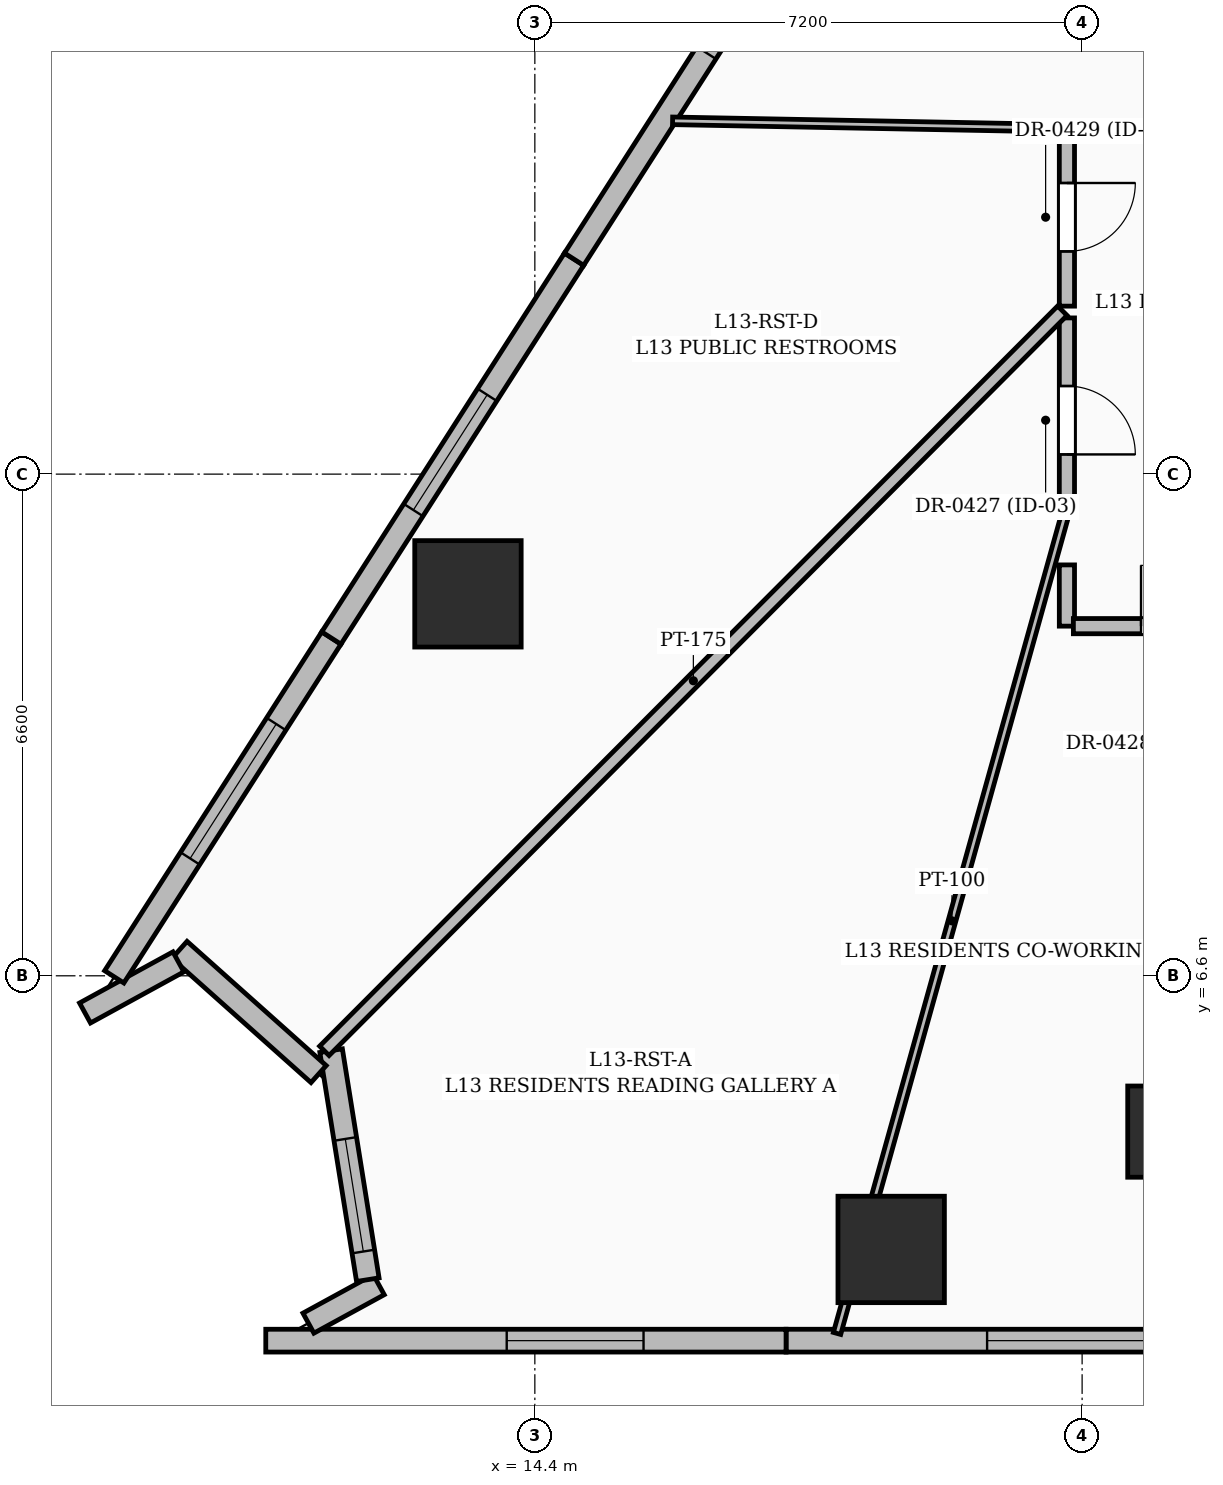
"""IFC4 building model, lengths in metres.
Left out: names, types, materials, properties, quantities, classifications, styles, units other than length and angle.
Written with IfcOpenShell. Run it as: python <this file> out.ifc"""

import sys

from ifc_helpers import new_model, si_unit, direction, frame, frame_2d, origin, origin_2d, place, context, subcontext, project, spatial, rectangle, extrude, element, fill, save


model = new_model("IFC4")
c1 = context("Model", 3, precision=1e-05, world=origin(), true_north=direction((0.0, 1.0)))
c2 = subcontext(c1, "Body", "Model", "MODEL_VIEW")
j1 = project(units=[si_unit("LENGTHUNIT", "METRE"), si_unit("PLANEANGLEUNIT", "RADIAN")], contexts=[c1])
p1 = place(None, origin())
s1 = spatial("IfcSite", under=j1, at=p1, CompositionType="ELEMENT")
p2 = place(p1, origin())
s2 = spatial("IfcBuilding", under=s1, at=p2, CompositionType="ELEMENT")
p3 = place(p2, frame((0.0, 0.0, 57.0)))
s3 = spatial("IfcBuildingStorey", under=s2, at=p3, CompositionType="ELEMENT", Elevation=57.0)
p4 = place(p3, frame((22.8, 4.55, 0.0), z_axis=(0.0, 0.0, 1.0), x_axis=(1.0, 0.0, 0.0)))
e1 = element("IfcColumn", 1, at=p4, inside=s3, PredefinedType="COLUMN", context=c2, shape_type="SweptSolid", body=[
    extrude(rectangle(XDim=1.2, YDim=1.2, at=origin_2d()), origin(), (0.0, 0.0, 1.0), 3.6),
])
for number, where, z_axis, x_axis in (
    (2, (19.088, 3.0, 0.0), (0.0, 0.0, 1.0), (1.0, 0.0, 0.0)),
    (3, (13.52, 11.625, 0.0), (0.0, 0.0, 1.0), (1.0, 0.0, 0.0)),
):
    element("IfcColumn", number, at=place(p3, frame(where, z_axis=z_axis, x_axis=x_axis)), inside=s3, PredefinedType="COLUMN", context=c2, shape_type="SweptSolid", body=[
        extrude(rectangle(XDim=1.4, YDim=1.4, at=origin_2d()), origin(), (0.0, 0.0, 1.0), 3.6),
    ])
p5 = place(p3, frame((24.55, 1.8, 0.0), z_axis=(0.0, 0.0, 1.0), x_axis=(-1.0, 0.0, 0.0)))
e4 = element("IfcWall", 4, at=p5, inside=s3, PredefinedType="SOLIDWALL", context=c2, shape_type="SweptSolid", body=[
    extrude(rectangle(XDim=6.845, YDim=0.3, at=frame_2d((3.422, 0.0))), origin(), (0.0, 0.0, 1.0), 3.35),
])
p6 = place(p5, frame((2.1, 0.0, 0.55)))
e5 = element("IfcOpeningElement", 5, at=p6, cuts=e4, PredefinedType="OPENING", context=c2, shape_type="SweptSolid", body=[
    extrude(rectangle(XDim=2.1, YDim=2.4, at=frame_2d((1.05, 1.2))), frame((0.0, 0.16, 0.0), z_axis=(0.0, -1.0, 0.0), x_axis=(1.0, 0.0, 0.0)), (0.0, 0.0, 1.0), 0.32),
])
p7 = place(p3, frame((17.705, 1.8, 0.0), z_axis=(0.0, 0.0, 1.0), x_axis=(-1.0, 0.0, 0.0)))
e6 = element("IfcWall", 6, at=p7, inside=s3, PredefinedType="SOLIDWALL", context=c2, shape_type="SweptSolid", body=[
    extrude(rectangle(XDim=6.845, YDim=0.3, at=frame_2d((3.422, 0.0))), origin(), (0.0, 0.0, 1.0), 3.35),
])
p8 = place(p7, frame((1.875, 0.0, 0.6)))
e7 = element("IfcOpeningElement", 7, at=p8, cuts=e6, PredefinedType="OPENING", context=c2, shape_type="SweptSolid", body=[
    extrude(rectangle(XDim=1.8, YDim=2.1, at=frame_2d((0.9, 1.05))), frame((0.0, 0.16, 0.0), z_axis=(0.0, -1.0, 0.0), x_axis=(1.0, 0.0, 0.0)), (0.0, 0.0, 1.0), 0.32),
])
p9 = place(p3, frame((11.421, 2.03, 0.0), z_axis=(0.0, 0.0, 1.0), x_axis=(0.877488347229, 0.479597957124, 0.0)))
e8 = element("IfcWall", 8, at=p9, inside=s3, PredefinedType="SOLIDWALL", context=c2, shape_type="SweptSolid", body=[
    extrude(rectangle(XDim=1.055, YDim=0.3, at=frame_2d((0.527, 0.0))), origin(), (0.0, 0.0, 1.0), 3.35),
])
p10 = place(p3, frame((12.203, 2.602, 0.0), z_axis=(0.0, 0.0, 1.0), x_axis=(-0.158180850876, 0.987410157136, 0.0)))
e9 = element("IfcWall", 9, at=p10, inside=s3, PredefinedType="SOLIDWALL", context=c2, shape_type="SweptSolid", body=[
    extrude(rectangle(XDim=3.051, YDim=0.3, at=frame_2d((1.526, 0.0))), origin(), (0.0, 0.0, 1.0), 3.35),
])
p11 = place(p10, frame((0.375, 0.0, 0.6)))
e10 = element("IfcOpeningElement", 10, at=p11, cuts=e9, PredefinedType="OPENING", context=c2, shape_type="SweptSolid", body=[
    extrude(rectangle(XDim=1.5, YDim=2.1, at=frame_2d((0.75, 1.05))), frame((0.0, 0.16, 0.0), z_axis=(0.0, -1.0, 0.0), x_axis=(1.0, 0.0, 0.0)), (0.0, 0.0, 1.0), 0.32),
])
p12 = place(p3, frame((11.555, 5.307, 0.0), z_axis=(0.0, 0.0, 1.0), x_axis=(-0.746018862661, 0.665924812989, 0.0)))
e11 = element("IfcWall", 11, at=p12, inside=s3, PredefinedType="SOLIDWALL", context=c2, shape_type="SweptSolid", body=[
    extrude(rectangle(XDim=2.454, YDim=0.3, at=frame_2d((1.227, 0.0))), origin(), (0.0, 0.0, 1.0), 3.35),
])
p13 = place(p3, frame((9.711, 6.783, 0.0), z_axis=(0.0, 0.0, 1.0), x_axis=(-0.877215145436, -0.480097478245, 0.0)))
e12 = element("IfcWall", 12, at=p13, inside=s3, PredefinedType="SOLIDWALL", context=c2, shape_type="SweptSolid", body=[
    extrude(rectangle(XDim=1.4, YDim=0.3, at=frame_2d((0.7, 0.0))), origin(), (0.0, 0.0, 1.0), 3.35),
])
p14 = place(p3, frame((8.867, 6.586, 0.0), z_axis=(0.0, 0.0, 1.0), x_axis=(0.539507708659, 0.841980660287, 0.0)))
e13 = element("IfcWall", 13, at=p14, inside=s3, PredefinedType="SOLIDWALL", context=c2, shape_type="SweptSolid", body=[
    extrude(rectangle(XDim=5.294, YDim=0.3, at=frame_2d((2.647, 0.0))), origin(), (0.0, 0.0, 1.0), 3.35),
])
p15 = place(p14, frame((1.85, 0.0, 0.55)))
e14 = element("IfcOpeningElement", 14, at=p15, cuts=e13, PredefinedType="OPENING", context=c2, shape_type="SweptSolid", body=[
    extrude(rectangle(XDim=2.1, YDim=2.4, at=frame_2d((1.05, 1.2))), frame((0.0, 0.16, 0.0), z_axis=(0.0, -1.0, 0.0), x_axis=(1.0, 0.0, 0.0)), (0.0, 0.0, 1.0), 0.32),
])
p16 = place(p3, frame((11.723, 11.044, 0.0), z_axis=(0.0, 0.0, 1.0), x_axis=(0.539512438074, 0.841977629847, 0.0)))
e15 = element("IfcWall", 15, at=p16, inside=s3, PredefinedType="SOLIDWALL", context=c2, shape_type="SweptSolid", body=[
    extrude(rectangle(XDim=5.919, YDim=0.3, at=frame_2d((2.959, 0.0))), origin(), (0.0, 0.0, 1.0), 3.35),
])
p17 = place(p16, frame((2.0, 0.0, 0.6)))
e16 = element("IfcOpeningElement", 16, at=p17, cuts=e15, PredefinedType="OPENING", context=c2, shape_type="SweptSolid", body=[
    extrude(rectangle(XDim=1.8, YDim=2.1, at=frame_2d((0.9, 1.05))), frame((0.0, 0.16, 0.0), z_axis=(0.0, -1.0, 0.0), x_axis=(1.0, 0.0, 0.0)), (0.0, 0.0, 1.0), 0.32),
])
p18 = place(p3, frame((14.916, 16.027, 0.0), z_axis=(0.0, 0.0, 1.0), x_axis=(0.53951188624, 0.841977983445, 0.0)))
e17 = element("IfcWall", 17, at=p18, inside=s3, PredefinedType="SOLIDWALL", context=c2, shape_type="SweptSolid", body=[
    extrude(rectangle(XDim=5.639, YDim=0.3, at=frame_2d((2.819, 0.0))), origin(), (0.0, 0.0, 1.0), 3.35),
])
p19 = place(p18, frame((3.225, 0.0, 0.55)))
e18 = element("IfcOpeningElement", 18, at=p19, cuts=e17, PredefinedType="OPENING", context=c2, shape_type="SweptSolid", body=[
    extrude(rectangle(XDim=1.6, YDim=2.2, at=frame_2d((0.8, 1.1))), frame((0.0, 0.16, 0.0), z_axis=(0.0, -1.0, 0.0), x_axis=(1.0, 0.0, 0.0)), (0.0, 0.0, 1.0), 0.32),
])
p20 = place(p3, frame((21.4, 15.255, 0.0), z_axis=(0.0, 0.0, 1.0), x_axis=(0.0, -1.0, 0.0)))
e19 = element("IfcWall", 19, at=p20, inside=s3, PredefinedType="PARTITIONING", context=c2, shape_type="SweptSolid", body=[
    extrude(rectangle(XDim=2.505, YDim=0.2, at=frame_2d((1.252, 0.0))), origin(), (0.0, 0.0, 1.0), 2.709),
])
p21 = place(p20, frame((0.896, 0.0, 0.0)))
e20 = element("IfcOpeningElement", 20, at=p21, cuts=e19, PredefinedType="OPENING", context=c2, shape_type="SweptSolid", body=[
    extrude(rectangle(XDim=0.9, YDim=2.1, at=frame_2d((0.45, 1.05))), frame((0.0, 0.11, 0.0), z_axis=(0.0, -1.0, 0.0), x_axis=(1.0, 0.0, 0.0)), (0.0, 0.0, 1.0), 0.22),
])
p22 = place(p3, frame((21.4, 12.006, 0.0), z_axis=(0.0, 0.0, 1.0), x_axis=(0.0, -1.0, 0.0)))
e21 = element("IfcWall", 21, at=p22, inside=s3, PredefinedType="PARTITIONING", context=c2, shape_type="SweptSolid", body=[
    extrude(rectangle(XDim=0.806, YDim=0.2, at=frame_2d((0.403, 0.0))), origin(), (0.0, 0.0, 1.0), 3.35),
])
p23 = place(p3, frame((21.485, 11.2, 0.0), z_axis=(0.0, 0.0, 1.0), x_axis=(1.0, 0.0, 0.0)))
e22 = element("IfcWall", 22, at=p23, inside=s3, PredefinedType="PARTITIONING", context=c2, shape_type="SweptSolid", body=[
    extrude(rectangle(XDim=3.384, YDim=0.2, at=frame_2d((1.692, 0.0))), origin(), (0.0, 0.0, 1.0), 2.709),
])
p24 = place(p23, frame((0.89, 0.0, 0.0)))
e23 = element("IfcOpeningElement", 23, at=p24, cuts=e22, PredefinedType="OPENING", context=c2, shape_type="SweptSolid", body=[
    extrude(rectangle(XDim=1.6, YDim=2.3, at=frame_2d((0.8, 1.15))), frame((0.0, 0.11, 0.0), z_axis=(0.0, -1.0, 0.0), x_axis=(1.0, 0.0, 0.0)), (0.0, 0.0, 1.0), 0.22),
])
p25 = place(p3, frame((21.4, 17.75, 0.0), z_axis=(0.0, 0.0, 1.0), x_axis=(0.0, -1.0, 0.0)))
e24 = element("IfcWall", 24, at=p25, inside=s3, PredefinedType="PARTITIONING", context=c2, shape_type="SweptSolid", body=[
    extrude(rectangle(XDim=2.34, YDim=0.2, at=frame_2d((1.17, 0.0))), origin(), (0.0, 0.0, 1.0), 2.709),
])
p26 = place(p25, frame((0.72, 0.0, 0.0)))
e25 = element("IfcOpeningElement", 25, at=p26, cuts=e24, PredefinedType="OPENING", context=c2, shape_type="SweptSolid", body=[
    extrude(rectangle(XDim=0.9, YDim=2.1, at=frame_2d((0.45, 1.05))), frame((0.0, 0.11, 0.0), z_axis=(0.0, -1.0, 0.0), x_axis=(1.0, 0.0, 0.0)), (0.0, 0.0, 1.0), 0.22),
])
p27 = place(p3, frame((33.4, 17.75, 0.0), z_axis=(0.0, 0.0, 1.0), x_axis=(-1.0, 0.0, 0.0)))
e26 = element("IfcWall", 26, at=p27, inside=s3, PredefinedType="PARTITIONING", context=c2, shape_type="SweptSolid", body=[
    extrude(rectangle(XDim=11.915, YDim=0.2, at=frame_2d((5.958, 0.0))), origin(), (0.0, 0.0, 1.0), 2.279),
])
p28 = place(p27, frame((5.49, 0.0, 0.0)))
e27 = element("IfcOpeningElement", 27, at=p28, cuts=e26, PredefinedType="OPENING", context=c2, shape_type="SweptSolid", body=[
    extrude(rectangle(XDim=0.9, YDim=2.1, at=frame_2d((0.45, 1.05))), frame((0.0, 0.11, 0.0), z_axis=(0.0, -1.0, 0.0), x_axis=(1.0, 0.0, 0.0)), (0.0, 0.0, 1.0), 0.22),
])
p29 = place(p3, frame((18.376, 1.895, 0.0), z_axis=(0.0, 0.0, 1.0), x_axis=(0.268356724251, 0.963319608723, 0.0)))
e28 = element("IfcWall", 28, at=p29, inside=s3, PredefinedType="PARTITIONING", context=c2, shape_type="SweptSolid", body=[
    extrude(rectangle(XDim=11.268, YDim=0.1, at=frame_2d((5.634, 0.0))), origin(), (0.0, 0.0, 1.0), 2.279),
])
p30 = place(p3, frame((21.34, 15.35, 0.0), z_axis=(0.0, 0.0, 1.0), x_axis=(-0.706085099818, -0.708126988481, 0.0)))
e29 = element("IfcWall", 29, at=p30, inside=s3, PredefinedType="PARTITIONING", context=c2, shape_type="SweptSolid", body=[
    extrude(rectangle(XDim=13.75, YDim=0.175, at=frame_2d((6.875, 0.0))), origin(), (0.0, 0.0, 1.0), 2.279),
])
p31 = place(p3, frame((21.315, 17.751, 0.0), z_axis=(0.0, 0.0, 1.0), x_axis=(-0.999820581263, 0.018942156262, 0.0)))
e30 = element("IfcWall", 30, at=p31, inside=s3, PredefinedType="PARTITIONING", context=c2, shape_type="SweptSolid", body=[
    extrude(rectangle(XDim=5.104, YDim=0.1, at=frame_2d((2.552, 0.0))), origin(), (0.0, 0.0, 1.0), 2.37),
])
p32 = place(p6, origin())
e31 = element("IfcWindow", 31, at=p32, inside=s3, PartitioningType="SINGLE_PANEL", PredefinedType="WINDOW", context=c2, shape_type="SweptSolid", body=[
    extrude(rectangle(XDim=2.1, YDim=2.4, at=frame_2d((1.05, 1.2))), frame((0.0, 0.03, 0.0), z_axis=(0.0, -1.0, 0.0), x_axis=(1.0, 0.0, 0.0)), (0.0, 0.0, 1.0), 0.06),
])
fill(e5, e31)
p33 = place(p8, origin())
e32 = element("IfcWindow", 32, at=p33, inside=s3, PartitioningType="SINGLE_PANEL", PredefinedType="WINDOW", context=c2, shape_type="SweptSolid", body=[
    extrude(rectangle(XDim=1.8, YDim=2.1, at=frame_2d((0.9, 1.05))), frame((0.0, 0.03, 0.0), z_axis=(0.0, -1.0, 0.0), x_axis=(1.0, 0.0, 0.0)), (0.0, 0.0, 1.0), 0.06),
])
fill(e7, e32)
p34 = place(p11, origin())
e33 = element("IfcWindow", 33, at=p34, inside=s3, PartitioningType="SINGLE_PANEL", PredefinedType="WINDOW", context=c2, shape_type="SweptSolid", body=[
    extrude(rectangle(XDim=1.5, YDim=2.1, at=frame_2d((0.75, 1.05))), frame((0.0, 0.03, 0.0), z_axis=(0.0, -1.0, 0.0), x_axis=(1.0, 0.0, 0.0)), (0.0, 0.0, 1.0), 0.06),
])
fill(e10, e33)
p35 = place(p15, origin())
e34 = element("IfcWindow", 34, at=p35, inside=s3, PartitioningType="SINGLE_PANEL", PredefinedType="WINDOW", context=c2, shape_type="SweptSolid", body=[
    extrude(rectangle(XDim=2.1, YDim=2.4, at=frame_2d((1.05, 1.2))), frame((0.0, 0.03, 0.0), z_axis=(0.0, -1.0, 0.0), x_axis=(1.0, 0.0, 0.0)), (0.0, 0.0, 1.0), 0.06),
])
fill(e14, e34)
p36 = place(p17, origin())
e35 = element("IfcWindow", 35, at=p36, inside=s3, PartitioningType="SINGLE_PANEL", PredefinedType="WINDOW", context=c2, shape_type="SweptSolid", body=[
    extrude(rectangle(XDim=1.8, YDim=2.1, at=frame_2d((0.9, 1.05))), frame((0.0, 0.03, 0.0), z_axis=(0.0, -1.0, 0.0), x_axis=(1.0, 0.0, 0.0)), (0.0, 0.0, 1.0), 0.06),
])
fill(e16, e35)
p37 = place(p19, origin())
e36 = element("IfcWindow", 36, at=p37, inside=s3, PartitioningType="SINGLE_PANEL", PredefinedType="WINDOW", context=c2, shape_type="SweptSolid", body=[
    extrude(rectangle(XDim=1.6, YDim=2.2, at=frame_2d((0.8, 1.1))), frame((0.0, 0.03, 0.0), z_axis=(0.0, -1.0, 0.0), x_axis=(1.0, 0.0, 0.0)), (0.0, 0.0, 1.0), 0.06),
])
fill(e18, e36)
p38 = place(p21, origin())
e37 = element("IfcDoor", 37, at=p38, inside=s3, OperationType="SINGLE_SWING_RIGHT", PredefinedType="DOOR", context=c2, shape_type="SweptSolid", body=[
    extrude(rectangle(XDim=0.9, YDim=2.1, at=frame_2d((0.45, 1.05))), frame((0.0, 0.025, 0.0), z_axis=(0.0, -1.0, 0.0), x_axis=(1.0, 0.0, 0.0)), (0.0, 0.0, 1.0), 0.05),
])
fill(e20, e37)
p39 = place(p24, origin())
e38 = element("IfcDoor", 38, at=p39, inside=s3, OperationType="DOUBLE_DOOR_SINGLE_SWING", PredefinedType="DOOR", context=c2, shape_type="SweptSolid", body=[
    extrude(rectangle(XDim=1.6, YDim=2.3, at=frame_2d((0.8, 1.15))), frame((0.0, 0.025, 0.0), z_axis=(0.0, -1.0, 0.0), x_axis=(1.0, 0.0, 0.0)), (0.0, 0.0, 1.0), 0.05),
])
fill(e23, e38)
p40 = place(p26, origin())
e39 = element("IfcDoor", 39, at=p40, inside=s3, OperationType="SINGLE_SWING_LEFT", PredefinedType="DOOR", context=c2, shape_type="SweptSolid", body=[
    extrude(rectangle(XDim=0.9, YDim=2.1, at=frame_2d((0.45, 1.05))), frame((0.0, 0.025, 0.0), z_axis=(0.0, -1.0, 0.0), x_axis=(1.0, 0.0, 0.0)), (0.0, 0.0, 1.0), 0.05),
])
fill(e25, e39)
save(model, sys.argv[1])
